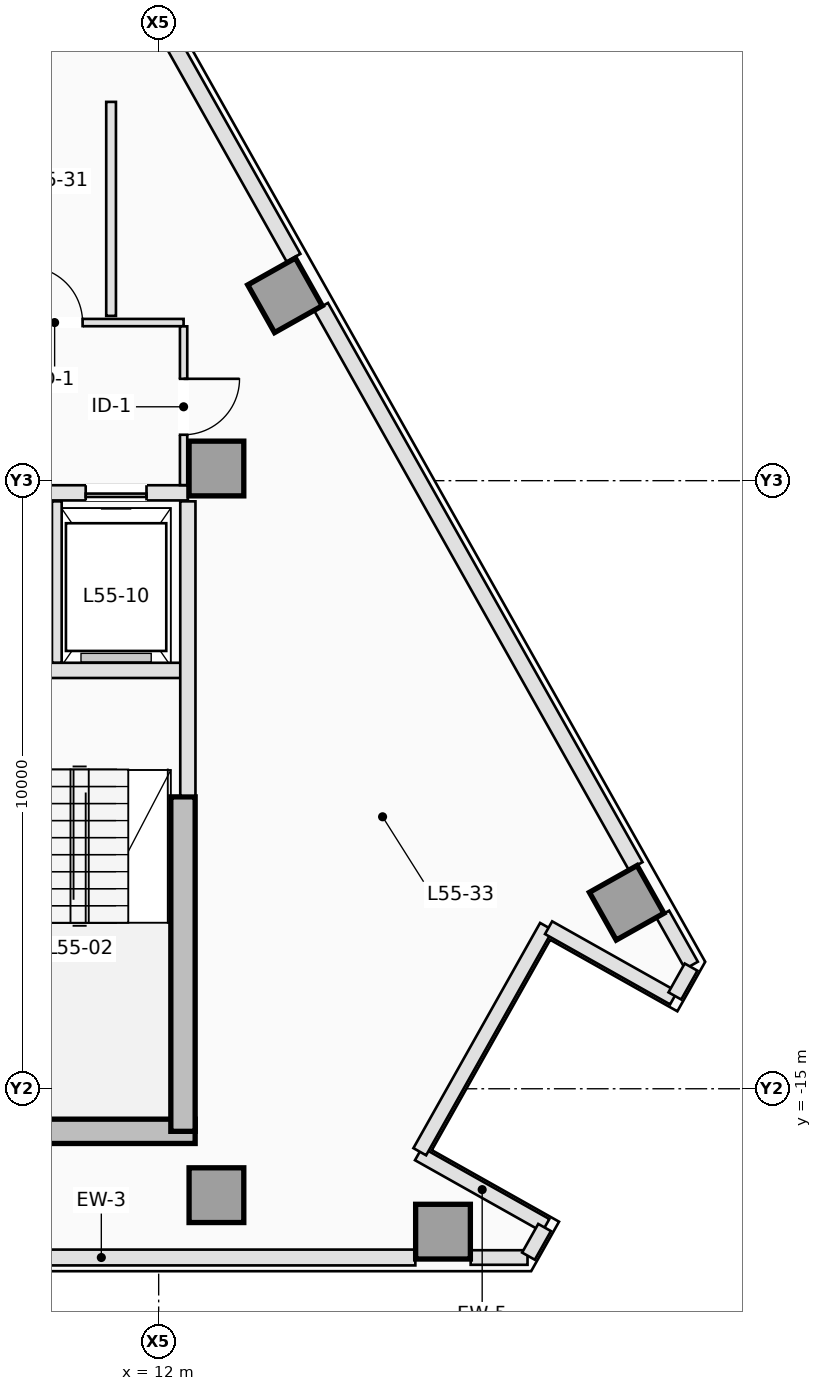
"""IFC4 building model, lengths in metres.
Left out: names, types, materials, properties, quantities, classifications, styles, units other than length and angle.
Written with IfcOpenShell. Run it as: python <this file> out.ifc"""

import sys

from ifc_helpers import new_model, si_unit, direction, frame, frame_2d, origin, origin_2d, place, context, subcontext, project, spatial, rectangle, extrude, element, fill, save


model = new_model("IFC4")
c1 = context("Model", 3, precision=1e-05, world=origin(), true_north=direction((0.0, 1.0)))
c2 = subcontext(c1, "Body", "Model", "MODEL_VIEW")
j1 = project(units=[si_unit("LENGTHUNIT", "METRE"), si_unit("PLANEANGLEUNIT", "RADIAN")], contexts=[c1])
p1 = place(None, origin())
s1 = spatial("IfcSite", under=j1, at=p1, CompositionType="ELEMENT")
p2 = place(p1, origin())
s2 = spatial("IfcBuilding", under=s1, at=p2, CompositionType="ELEMENT")
p3 = place(p2, frame((0.0, 0.0, 200.9)))
s3 = spatial("IfcBuildingStorey", under=s2, at=p3, CompositionType="ELEMENT", Elevation=200.9)
p4 = place(p3, frame((8.8, -15.7, 0.0), z_axis=(0.0, 0.0, 1.0), x_axis=(1.0, 0.0, 0.0)))
e1 = element("IfcWall", 1, at=p4, inside=s3, PredefinedType="SHEAR", context=c2, shape_type="SweptSolid", body=[
    extrude(rectangle(XDim=3.8, YDim=0.4, at=frame_2d((1.9, 0.0))), origin(), (0.0, 0.0, 1.0), 3.5),
])
p5 = place(p3, frame((12.4, -15.7, 0.0), z_axis=(0.0, 0.0, 1.0), x_axis=(0.0, 1.0, 0.0)))
e2 = element("IfcWall", 2, at=p5, inside=s3, PredefinedType="SHEAR", context=c2, shape_type="SweptSolid", body=[
    extrude(rectangle(XDim=5.5, YDim=0.4, at=frame_2d((2.75, 0.0))), origin(), (0.0, 0.0, 1.0), 3.5),
])
for number, where, z_axis, x_axis in (
    (3, (12.95, -16.75, 0.0), (0.0, 0.0, 1.0), (1.0, 0.0, 0.0)),
    (4, (12.95, -4.8, 0.0), (0.0, 0.0, 1.0), (1.0, 0.0, 0.0)),
    (5, (16.676, -17.35, 0.0), (0.0, 0.0, 1.0), (0.0, 1.0, 0.0)),
    (6, (19.697, -11.942, 0.0), (0.0, 0.0, 1.0), (0.872, 0.49, 0.0)),
    (7, (14.077, -1.952, 0.0), (0.0, 0.0, 1.0), (0.872, 0.49, 0.0)),
):
    element("IfcColumn", number, at=place(p3, frame(where, z_axis=z_axis, x_axis=x_axis)), inside=s3, PredefinedType="COLUMN", context=c2, shape_type="SweptSolid", body=[
        extrude(rectangle(XDim=0.9, YDim=0.9, at=origin_2d()), origin(), (0.0, 0.0, 1.0), 3.5),
    ])
p6 = place(p3, frame((18.066, -17.775, 0.0), z_axis=(0.0, 0.0, 1.0), x_axis=(-1.0, 0.0, 0.0)))
e8 = element("IfcWall", 8, at=p6, inside=s3, PredefinedType="STANDARD", context=c2, shape_type="SweptSolid", body=[
    extrude(rectangle(XDim=0.935, YDim=0.24, at=frame_2d((0.468, 0.0))), origin(), (0.0, 0.0, 1.0), 3.25),
])
p7 = place(p3, frame((16.221, -17.775, 0.0), z_axis=(0.0, 0.0, 1.0), x_axis=(-1.0, 0.0, 0.0)))
e9 = element("IfcWall", 9, at=p7, inside=s3, PredefinedType="STANDARD", context=c2, shape_type="SweptSolid", body=[
    extrude(rectangle(XDim=10.328, YDim=0.26, at=frame_2d((5.164, 0.0))), origin(), (0.0, 0.0, 1.0), 3.25),
])
p8 = place(p3, frame((20.29, -12.13, 0.0), z_axis=(0.0, 0.0, 1.0), x_axis=(0.490345412687, -0.87152818443, 0.0)))
e10 = element("IfcWall", 10, at=p8, inside=s3, PredefinedType="STANDARD", context=c2, shape_type="SweptSolid", body=[
    extrude(rectangle(XDim=0.964, YDim=0.24, at=frame_2d((0.482, 0.0))), origin(), (0.0, 0.0, 1.0), 3.25),
])
p9 = place(p3, frame((14.671, -2.14, 0.0), z_axis=(0.0, 0.0, 1.0), x_axis=(0.490246958575, -0.871583570066, 0.0)))
e11 = element("IfcWall", 11, at=p9, inside=s3, PredefinedType="STANDARD", context=c2, shape_type="SweptSolid", body=[
    extrude(rectangle(XDim=10.552, YDim=0.26, at=frame_2d((5.276, 0.0))), origin(), (0.0, 0.0, 1.0), 3.25),
])
p10 = place(p3, frame((12.066, 2.49, 0.0), z_axis=(0.0, 0.0, 1.0), x_axis=(0.490261239633, -0.871575537125, 0.0)))
e12 = element("IfcWall", 12, at=p10, inside=s3, PredefinedType="STANDARD", context=c2, shape_type="SweptSolid", body=[
    extrude(rectangle(XDim=4.388, YDim=0.26, at=frame_2d((2.194, 0.0))), origin(), (0.0, 0.0, 1.0), 3.25),
])
p11 = place(p3, frame((18.366, -17.247, 0.0), z_axis=(0.0, 0.0, 1.0), x_axis=(-0.871597270235, 0.490222600988, 0.0)))
e13 = element("IfcWall", 13, at=p11, inside=s3, PredefinedType="STANDARD", context=c2, shape_type="SweptSolid", body=[
    extrude(rectangle(XDim=2.4, YDim=0.24, at=frame_2d((1.2, 0.0))), origin(), (0.0, 0.0, 1.0), 3.25),
])
p12 = place(p3, frame((16.294, -16.035, 0.0), z_axis=(0.0, 0.0, 1.0), x_axis=(0.49027487746, 0.871567865706, 0.0)))
e14 = element("IfcWall", 14, at=p12, inside=s3, PredefinedType="STANDARD", context=c2, shape_type="SweptSolid", body=[
    extrude(rectangle(XDim=4.25, YDim=0.24, at=frame_2d((2.125, 0.0))), origin(), (0.0, 0.0, 1.0), 2.722),
])
p13 = place(p3, frame((18.412, -12.351, 0.0), z_axis=(0.0, 0.0, 1.0), x_axis=(0.871578299909, -0.490256327984, 0.0)))
e15 = element("IfcWall", 15, at=p13, inside=s3, PredefinedType="STANDARD", context=c2, shape_type="SweptSolid", body=[
    extrude(rectangle(XDim=2.36, YDim=0.24, at=frame_2d((1.18, 0.0))), origin(), (0.0, 0.0, 1.0), 3.25),
])
p14 = place(p3, frame((20.489, -13.473, 0.0), z_axis=(0.0, 0.0, 1.0), x_axis=(0.490133374867, 0.87164744871, 0.0)))
e16 = element("IfcWall", 16, at=p14, inside=s3, PredefinedType="STANDARD", context=c2, shape_type="SweptSolid", body=[
    extrude(rectangle(XDim=0.544, YDim=0.24, at=frame_2d((0.272, 0.0))), origin(), (0.0, 0.0, 1.0), 3.25),
])
p15 = place(p3, frame((18.081, -17.753, 0.0), z_axis=(0.0, 0.0, 1.0), x_axis=(0.490582915772, 0.871394516136, 0.0)))
e17 = element("IfcWall", 17, at=p15, inside=s3, PredefinedType="STANDARD", context=c2, shape_type="SweptSolid", body=[
    extrude(rectangle(XDim=0.541, YDim=0.24, at=frame_2d((0.27, 0.0))), origin(), (0.0, 0.0, 1.0), 3.25),
])
p16 = place(p3, frame((9.16, -8.12, 0.0), z_axis=(0.0, 0.0, 1.0), x_axis=(1.0, 0.0, 0.0)))
e18 = element("IfcWall", 18, at=p16, inside=s3, PredefinedType="PARTITIONING", context=c2, shape_type="SweptSolid", body=[
    extrude(rectangle(XDim=3.22, YDim=0.25, at=frame_2d((1.61, 0.0))), origin(), (0.0, 0.0, 1.0), 3.25),
])
p17 = place(p3, frame((12.48, -10.18, 0.0), z_axis=(0.0, 0.0, 1.0), x_axis=(0.0, 1.0, 0.0)))
e19 = element("IfcWall", 19, at=p17, inside=s3, PredefinedType="PARTITIONING", context=c2, shape_type="SweptSolid", body=[
    extrude(rectangle(XDim=4.84, YDim=0.25, at=frame_2d((2.42, 0.0))), origin(), (0.0, 0.0, 1.0), 3.25),
])
p18 = place(p3, frame((4.202, -5.2, 0.0), z_axis=(0.0, 0.0, 1.0), x_axis=(1.0, 0.0, 0.0)))
e20 = element("IfcWall", 20, at=p18, inside=s3, PredefinedType="PARTITIONING", context=c2, shape_type="SweptSolid", body=[
    extrude(rectangle(XDim=8.278, YDim=0.25, at=frame_2d((4.139, 0.0))), origin(), (0.0, 0.0, 1.0), 3.25),
])
p19 = place(p18, frame((0.748, 0.0, 0.0)))
e21 = element("IfcOpeningElement", 21, at=p19, cuts=e20, PredefinedType="OPENING", context=c2, shape_type="SweptSolid", body=[
    extrude(rectangle(XDim=1.0, YDim=2.15, at=frame_2d((0.5, 1.075))), frame((0.0, 0.135, 0.0), z_axis=(0.0, -1.0, 0.0), x_axis=(1.0, 0.0, 0.0)), (0.0, 0.0, 1.0), 0.27),
])
p20 = place(p18, frame((2.698, 0.0, 0.0)))
e22 = element("IfcOpeningElement", 22, at=p20, cuts=e20, PredefinedType="OPENING", context=c2, shape_type="SweptSolid", body=[
    extrude(rectangle(XDim=1.0, YDim=2.15, at=frame_2d((0.5, 1.075))), frame((0.0, 0.135, 0.0), z_axis=(0.0, -1.0, 0.0), x_axis=(1.0, 0.0, 0.0)), (0.0, 0.0, 1.0), 0.27),
])
p21 = place(p18, frame((4.648, 0.0, 0.0)))
e23 = element("IfcOpeningElement", 23, at=p21, cuts=e20, PredefinedType="OPENING", context=c2, shape_type="SweptSolid", body=[
    extrude(rectangle(XDim=1.0, YDim=2.15, at=frame_2d((0.5, 1.075))), frame((0.0, 0.135, 0.0), z_axis=(0.0, -1.0, 0.0), x_axis=(1.0, 0.0, 0.0)), (0.0, 0.0, 1.0), 0.27),
])
p22 = place(p18, frame((6.598, 0.0, 0.0)))
e24 = element("IfcOpeningElement", 24, at=p22, cuts=e20, PredefinedType="OPENING", context=c2, shape_type="SweptSolid", body=[
    extrude(rectangle(XDim=1.0, YDim=2.15, at=frame_2d((0.5, 1.075))), frame((0.0, 0.135, 0.0), z_axis=(0.0, -1.0, 0.0), x_axis=(1.0, 0.0, 0.0)), (0.0, 0.0, 1.0), 0.27),
])
p23 = place(p3, frame((10.325, -7.993, 0.0), z_axis=(0.0, 0.0, 1.0), x_axis=(0.0, 1.0, 0.0)))
e25 = element("IfcWall", 25, at=p23, inside=s3, PredefinedType="PARTITIONING", context=c2, shape_type="SweptSolid", body=[
    extrude(rectangle(XDim=2.653, YDim=0.16, at=frame_2d((1.326, 0.0))), origin(), (0.0, 0.0, 1.0), 3.25),
])
p24 = place(p3, frame((8.612, -2.4, 0.0), z_axis=(0.0, 0.0, 1.0), x_axis=(1.0, 0.0, 0.0)))
e26 = element("IfcWall", 26, at=p24, inside=s3, PredefinedType="PARTITIONING", context=c2, shape_type="SweptSolid", body=[
    extrude(rectangle(XDim=3.798, YDim=0.12, at=frame_2d((1.899, 0.0))), origin(), (0.0, 0.0, 1.0), 3.25),
])
p25 = place(p24, frame((1.217, 0.0, 0.0)))
e27 = element("IfcOpeningElement", 27, at=p25, cuts=e26, PredefinedType="OPENING", context=c2, shape_type="SweptSolid", body=[
    extrude(rectangle(XDim=0.92, YDim=2.12, at=frame_2d((0.46, 1.06))), frame((0.0, 0.07, 0.0), z_axis=(0.0, -1.0, 0.0), x_axis=(1.0, 0.0, 0.0)), (0.0, 0.0, 1.0), 0.14),
])
p26 = place(p3, frame((12.41, -2.462, 0.0), z_axis=(0.0, 0.0, 1.0), x_axis=(0.0, -1.0, 0.0)))
e28 = element("IfcWall", 28, at=p26, inside=s3, PredefinedType="PARTITIONING", context=c2, shape_type="SweptSolid", body=[
    extrude(rectangle(XDim=2.611, YDim=0.12, at=frame_2d((1.306, 0.0))), origin(), (0.0, 0.0, 1.0), 3.25),
])
p27 = place(p26, frame((0.863, 0.0, 0.0)))
e29 = element("IfcOpeningElement", 29, at=p27, cuts=e28, PredefinedType="OPENING", context=c2, shape_type="SweptSolid", body=[
    extrude(rectangle(XDim=0.92, YDim=2.12, at=frame_2d((0.46, 1.06))), frame((0.0, 0.07, 0.0), z_axis=(0.0, -1.0, 0.0), x_axis=(1.0, 0.0, 0.0)), (0.0, 0.0, 1.0), 0.14),
])
p28 = place(p3, frame((11.217, 1.229, 0.0), z_axis=(0.0, 0.0, 1.0), x_axis=(0.0, -1.0, 0.0)))
e30 = element("IfcWall", 30, at=p28, inside=s3, PredefinedType="PARTITIONING", context=c2, shape_type="SweptSolid", body=[
    extrude(rectangle(XDim=3.519, YDim=0.16, at=frame_2d((1.76, 0.0))), origin(), (0.0, 0.0, 1.0), 3.25),
])
p29 = place(p22, origin())
e31 = element("IfcDoor", 31, at=p29, inside=s3, OperationType="SLIDING_TO_RIGHT", PredefinedType="DOOR", context=c2, shape_type="SweptSolid", body=[
    extrude(rectangle(XDim=1.0, YDim=2.15, at=frame_2d((0.5, 1.075))), frame((0.0, 0.025, 0.0), z_axis=(0.0, -1.0, 0.0), x_axis=(1.0, 0.0, 0.0)), (0.0, 0.0, 1.0), 0.05),
])
fill(e24, e31)
p30 = place(p25, origin())
e32 = element("IfcDoor", 32, at=p30, inside=s3, OperationType="SINGLE_SWING_LEFT", PredefinedType="DOOR", context=c2, shape_type="SweptSolid", body=[
    extrude(rectangle(XDim=0.92, YDim=2.12, at=frame_2d((0.46, 1.06))), frame((0.0, 0.025, 0.0), z_axis=(0.0, -1.0, 0.0), x_axis=(1.0, 0.0, 0.0)), (0.0, 0.0, 1.0), 0.05),
])
fill(e27, e32)
p31 = place(p27, origin())
e33 = element("IfcDoor", 33, at=p31, inside=s3, OperationType="SINGLE_SWING_LEFT", PredefinedType="DOOR", context=c2, shape_type="SweptSolid", body=[
    extrude(rectangle(XDim=0.92, YDim=2.12, at=frame_2d((0.46, 1.06))), frame((0.0, 0.025, 0.0), z_axis=(0.0, -1.0, 0.0), x_axis=(1.0, 0.0, 0.0)), (0.0, 0.0, 1.0), 0.05),
])
fill(e29, e33)
save(model, sys.argv[1])
